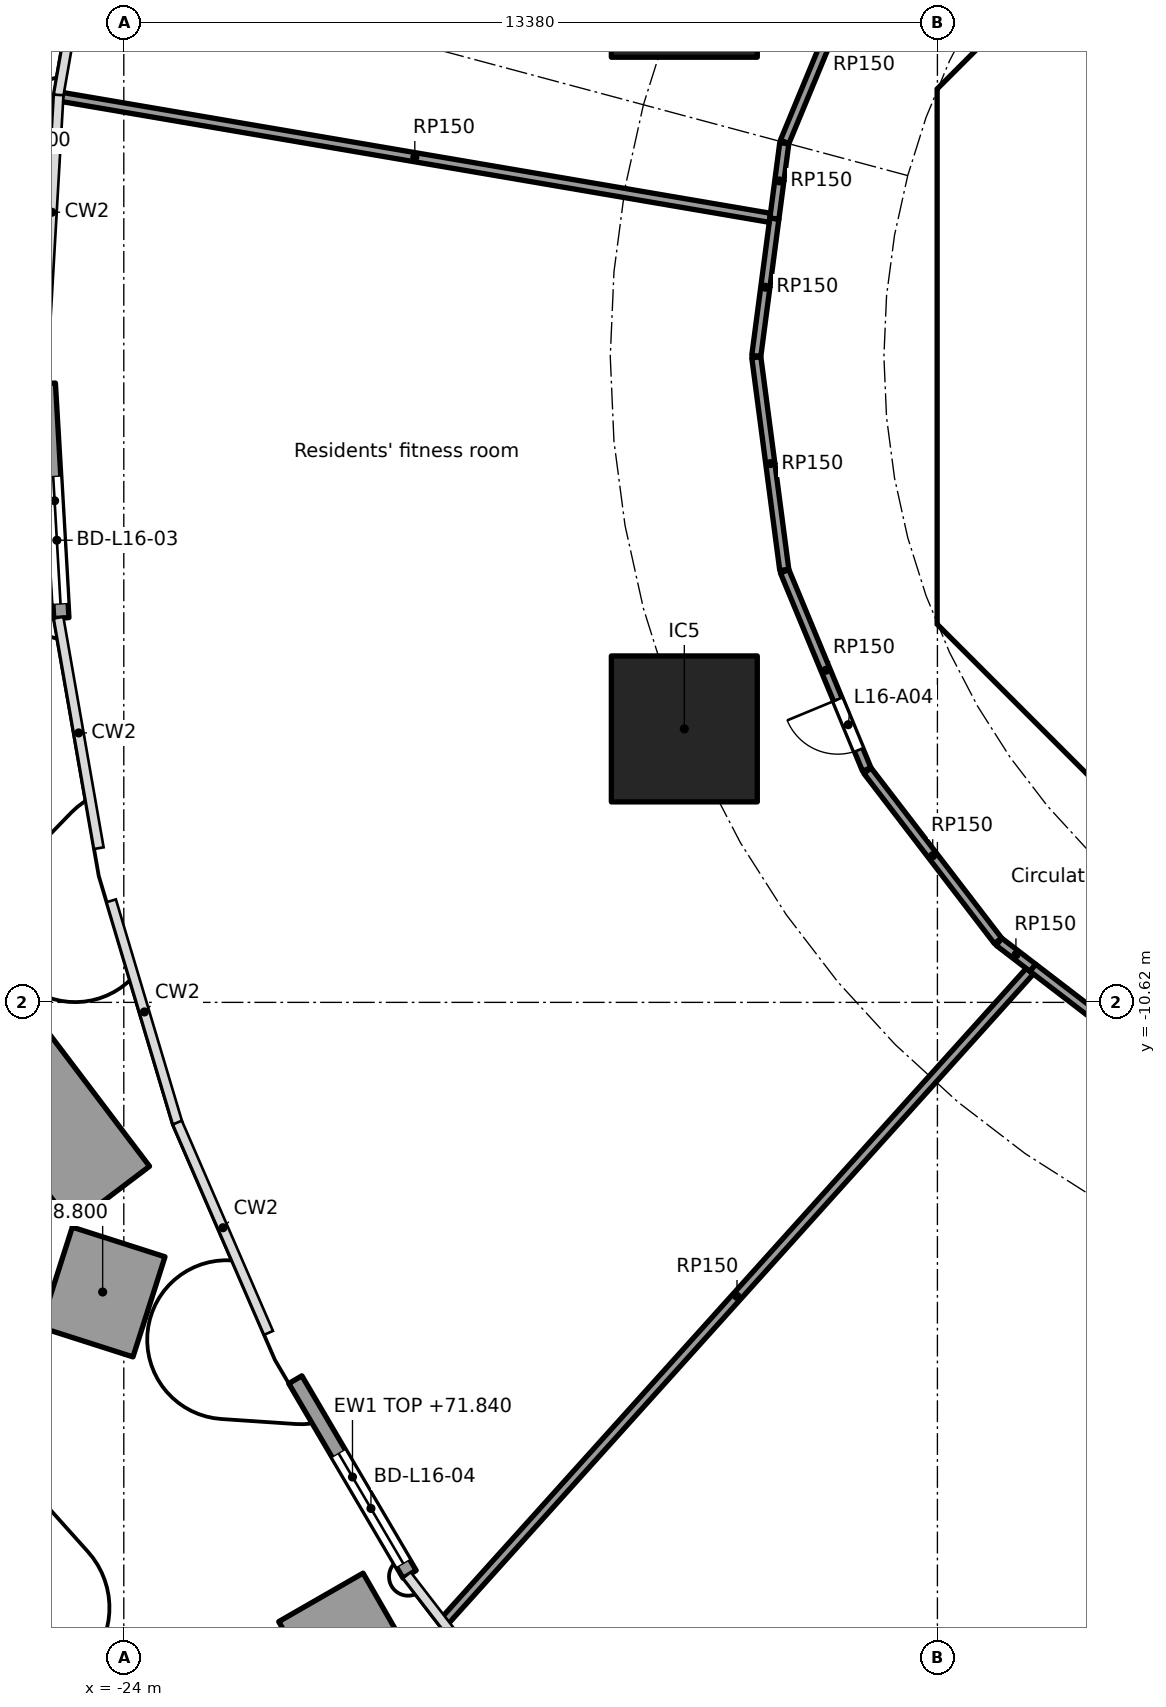
"""IFC4 building model, lengths in metres.
Left out: names, types, materials, properties, quantities, classifications, styles, units other than length and angle.
Written with IfcOpenShell. Run it as: python <this file> out.ifc"""

import sys

from ifc_helpers import new_model, si_unit, direction, frame, frame_2d, origin, origin_2d, place, context, subcontext, project, spatial, polyline, rectangle, outline, extrude, element, fill, save


model = new_model("IFC4")
c1 = context("Model", 3, precision=1e-05, world=origin(), true_north=direction((0.0, 1.0)))
c2 = subcontext(c1, "Body", "Model", "MODEL_VIEW")
j1 = project(units=[si_unit("LENGTHUNIT", "METRE"), si_unit("PLANEANGLEUNIT", "RADIAN")], contexts=[c1])
p1 = place(None, origin())
s1 = spatial("IfcSite", under=j1, at=p1, CompositionType="ELEMENT")
p2 = place(p1, origin())
s2 = spatial("IfcBuilding", under=s1, at=p2, CompositionType="ELEMENT")
p3 = place(p2, frame((0.0, 0.0, 67.7)))
s3 = spatial("IfcBuildingStorey", under=s2, at=p3, CompositionType="ELEMENT", Elevation=67.7)
for number, where, z_axis, x_axis in (
    (1, (-14.782, 6.123, 0.0), (0.0, 0.0, 1.0), (1.0, 0.0, 0.0)),
    (2, (-14.782, -6.123, 0.0), (0.0, 0.0, 1.0), (1.0, 0.0, 0.0)),
):
    element("IfcColumn", number, at=place(p3, frame(where, z_axis=z_axis, x_axis=x_axis)), inside=s3, PredefinedType="COLUMN", context=c2, shape_type="SweptSolid", body=[
        extrude(rectangle(XDim=2.4, YDim=2.4, at=origin_2d()), origin(), (0.0, 0.0, 1.0), 5.6),
    ])
p4 = place(p3, frame((-25.027, -4.3, 0.0), z_axis=(0.0, 0.0, 1.0), x_axis=(-0.057488767917, 0.998346153177, 0.0)))
e3 = element("IfcWall", 3, at=p4, inside=s3, PredefinedType="SOLIDWALL", context=c2, shape_type="SweptSolid", body=[
    extrude(rectangle(XDim=3.865, YDim=0.25, at=frame_2d((1.932, 0.0))), origin(), (0.0, 0.0, 1.0), 5.34),
])
p5 = place(p4, frame((0.232, 0.0, 0.0)))
e4 = element("IfcOpeningElement", 4, at=p5, cuts=e3, PredefinedType="OPENING", context=c2, shape_type="SweptSolid", body=[
    extrude(rectangle(XDim=2.1, YDim=2.4, at=frame_2d((1.05, 1.2))), frame((0.0, 0.135, 0.0), z_axis=(0.0, -1.0, 0.0), x_axis=(1.0, 0.0, 0.0)), (0.0, 0.0, 1.0), 0.27),
])
p6 = place(p3, frame((-19.3, -20.026, 0.0), z_axis=(0.0, 0.0, 1.0), x_axis=(-0.506338799739, 0.862334633352, 0.0)))
e5 = element("IfcWall", 5, at=p6, inside=s3, PredefinedType="SOLIDWALL", context=c2, shape_type="SweptSolid", body=[
    extrude(rectangle(XDim=3.712, YDim=0.25, at=frame_2d((1.856, 0.0))), origin(), (0.0, 0.0, 1.0), 4.14),
])
p7 = place(p6, frame((0.206, 0.0, 0.0)))
e6 = element("IfcOpeningElement", 6, at=p7, cuts=e5, PredefinedType="OPENING", context=c2, shape_type="SweptSolid", body=[
    extrude(rectangle(XDim=2.1, YDim=2.4, at=frame_2d((1.05, 1.2))), frame((0.0, 0.135, 0.0), z_axis=(0.0, -1.0, 0.0), x_axis=(1.0, 0.0, 0.0)), (0.0, 0.0, 1.0), 0.27),
])
p8 = place(p3, frame((-27.187, -9.874, 0.0), z_axis=(0.0, 0.0, 1.0), x_axis=(0.603738339335, -0.797182549745, 0.0)))
e7 = element("IfcWall", 7, at=p8, inside=s3, PredefinedType="SOLIDWALL", context=c2, shape_type="SweptSolid", body=[
    extrude(rectangle(XDim=4.923, YDim=1.6, at=frame_2d((2.462, 0.0))), origin(), (0.0, 0.0, 1.0), 1.1),
])
p9 = place(p3, frame((-24.084, -14.56, 0.0), z_axis=(0.0, 0.0, 1.0), x_axis=(-0.304632172772, -0.95247007266, 0.0)))
e8 = element("IfcWall", 8, at=p9, inside=s3, PredefinedType="SOLIDWALL", context=c2, shape_type="SweptSolid", body=[
    extrude(rectangle(XDim=1.728, YDim=1.6, at=frame_2d((0.864, 0.0))), origin(), (0.0, 0.0, 1.0), 1.1),
])
p10 = place(p3, frame((-20.758, -20.405, 0.0), z_axis=(0.0, 0.0, 1.0), x_axis=(0.498299562328, -0.867004928581, 0.0)))
e9 = element("IfcWall", 9, at=p10, inside=s3, PredefinedType="SOLIDWALL", context=c2, shape_type="SweptSolid", body=[
    extrude(rectangle(XDim=4.572, YDim=1.6, at=frame_2d((2.286, 0.0))), origin(), (0.0, 0.0, 1.0), 1.1),
])
p11 = place(p3, frame((-4.613, 9.988, 0.0), z_axis=(0.0, 0.0, 1.0), x_axis=(-0.707106781187, -0.707106781187, 0.0)))
e10 = element("IfcWall", 10, at=p11, inside=s3, PredefinedType="SHEAR", context=c2, shape_type="SweptSolid", body=[
    extrude(rectangle(XDim=7.602, YDim=0.6, at=frame_2d((3.801, 0.0))), origin(), (0.0, 0.0, 1.0), 5.34),
])
p12 = place(p11, frame((0.351, 0.0, 0.0)))
e11 = element("IfcOpeningElement", 11, at=p12, cuts=e10, PredefinedType="OPENING", context=c2, shape_type="SweptSolid", body=[
    extrude(rectangle(XDim=1.1, YDim=2.1, at=frame_2d((0.55, 1.05))), frame((0.0, 0.31, 0.0), z_axis=(0.0, -1.0, 0.0), x_axis=(1.0, 0.0, 0.0)), (0.0, 0.0, 1.0), 0.62),
])
p13 = place(p3, frame((-10.325, 3.801, 0.0), z_axis=(0.0, 0.0, 1.0), x_axis=(0.0, -1.0, 0.0)))
e12 = element("IfcWall", 12, at=p13, inside=s3, PredefinedType="SHEAR", context=c2, shape_type="SweptSolid", body=[
    extrude(rectangle(XDim=7.602, YDim=0.6, at=frame_2d((3.801, 0.0))), origin(), (0.0, 0.0, 1.0), 5.34),
])
p14 = place(p13, frame((0.651, 0.0, 0.0)))
e13 = element("IfcOpeningElement", 13, at=p14, cuts=e12, PredefinedType="OPENING", context=c2, shape_type="SweptSolid", body=[
    extrude(rectangle(XDim=1.5, YDim=2.1, at=frame_2d((0.75, 1.05))), frame((0.0, 0.31, 0.0), z_axis=(0.0, -1.0, 0.0), x_axis=(1.0, 0.0, 0.0)), (0.0, 0.0, 1.0), 0.62),
])
p15 = place(p13, frame((5.451, 0.0, 0.0)))
e14 = element("IfcOpeningElement", 14, at=p15, cuts=e12, PredefinedType="OPENING", context=c2, shape_type="SweptSolid", body=[
    extrude(rectangle(XDim=1.5, YDim=2.1, at=frame_2d((0.75, 1.05))), frame((0.0, 0.31, 0.0), z_axis=(0.0, -1.0, 0.0), x_axis=(1.0, 0.0, 0.0)), (0.0, 0.0, 1.0), 0.62),
])
p16 = place(p3, frame((-9.988, -4.613, 0.0), z_axis=(0.0, 0.0, 1.0), x_axis=(0.707106781187, -0.707106781187, 0.0)))
e15 = element("IfcWall", 15, at=p16, inside=s3, PredefinedType="SHEAR", context=c2, shape_type="SweptSolid", body=[
    extrude(rectangle(XDim=7.602, YDim=0.6, at=frame_2d((3.801, 0.0))), origin(), (0.0, 0.0, 1.0), 5.34),
])
p17 = place(p16, frame((6.151, 0.0, 0.0)))
e16 = element("IfcOpeningElement", 16, at=p17, cuts=e15, PredefinedType="OPENING", context=c2, shape_type="SweptSolid", body=[
    extrude(rectangle(XDim=1.1, YDim=2.1, at=frame_2d((0.55, 1.05))), frame((0.0, 0.31, 0.0), z_axis=(0.0, -1.0, 0.0), x_axis=(1.0, 0.0, 0.0)), (0.0, 0.0, 1.0), 0.62),
])
p18 = place(p3, origin())
e17 = element("IfcWall", 17, at=p18, inside=s3, PredefinedType="SHEAR", context=c2, shape_type="SweptSolid", body=[
    extrude(outline(polyline([(-10.625, -3.801), (-10.025, -3.801), (-10.025, -4.152), (-9.776, -4.401), (-10.2, -4.825), (-10.625, -4.401), (-10.625, -3.801)])), origin(), (0.0, 0.0, 1.0), 5.34),
])
p19 = place(p3, origin())
e18 = element("IfcWall", 18, at=p19, inside=s3, PredefinedType="SHEAR", context=c2, shape_type="SweptSolid", body=[
    extrude(outline(polyline([(-10.2, 4.825), (-9.776, 4.401), (-10.025, 4.152), (-10.025, 3.801), (-10.625, 3.801), (-10.625, 4.401), (-10.2, 4.825)])), origin(), (0.0, 0.0, 1.0), 5.34),
])
for number, where, z_axis, x_axis in (
    (19, (-10.025, -4.0, 0.0), (0.0, 0.0, 1.0), (1.0, 0.0, 0.0)),
    (20, (-10.025, 4.0, 0.0), (0.0, 0.0, 1.0), (1.0, 0.0, 0.0)),
):
    element("IfcWall", number, at=place(p3, frame(where, z_axis=z_axis, x_axis=x_axis)), inside=s3, PredefinedType="PARTITIONING", context=c2, shape_type="SweptSolid", body=[
        extrude(rectangle(XDim=3.325, YDim=0.2, at=frame_2d((1.662, 0.0))), origin(), (0.0, 0.0, 1.0), 5.34),
    ])
p20 = place(p3, frame((-13.598, 0.012, 0.0), z_axis=(0.0, 0.0, 1.0), x_axis=(0.130457285505, 0.991453930679, 0.0)))
e21 = element("IfcWall", 21, at=p20, inside=s3, PredefinedType="PARTITIONING", context=c2, shape_type="SweptSolid", body=[
    extrude(rectangle(XDim=2.278, YDim=0.15, at=frame_2d((1.139, 0.0))), origin(), (0.0, 0.0, 1.0), 5.34),
])
p21 = place(p3, frame((-13.375, 2.282, 0.0), z_axis=(0.0, 0.0, 1.0), x_axis=(-0.985753347153, 0.168197320361, 0.0)))
e22 = element("IfcWall", 22, at=p21, inside=s3, PredefinedType="PARTITIONING", context=c2, shape_type="SweptSolid", body=[
    extrude(rectangle(XDim=11.847, YDim=0.15, at=frame_2d((5.924, 0.0))), origin(), (0.0, 0.0, 1.0), 5.34),
])
p22 = place(p3, frame((-13.301, 2.27, 0.0), z_axis=(0.0, 0.0, 1.0), x_axis=(0.130575867104, 0.991438320285, 0.0)))
e23 = element("IfcWall", 23, at=p22, inside=s3, PredefinedType="PARTITIONING", context=c2, shape_type="SweptSolid", body=[
    extrude(rectangle(XDim=1.249, YDim=0.15, at=frame_2d((0.625, 0.0))), origin(), (0.0, 0.0, 1.0), 5.34),
])
p23 = place(p3, frame((-13.138, -3.508, 0.0), z_axis=(0.0, 0.0, 1.0), x_axis=(-0.130499283623, 0.991448403586, 0.0)))
e24 = element("IfcWall", 24, at=p23, inside=s3, PredefinedType="PARTITIONING", context=c2, shape_type="SweptSolid", body=[
    extrude(rectangle(XDim=3.527, YDim=0.15, at=frame_2d((1.763, 0.0))), origin(), (0.0, 0.0, 1.0), 5.34),
])
p24 = place(p3, frame((-13.132, 3.531, 0.0), z_axis=(0.0, 0.0, 1.0), x_axis=(0.382677866108, 0.923881838111, 0.0)))
e25 = element("IfcWall", 25, at=p24, inside=s3, PredefinedType="PARTITIONING", context=c2, shape_type="SweptSolid", body=[
    extrude(rectangle(XDim=3.527, YDim=0.15, at=frame_2d((1.763, 0.0))), origin(), (0.0, 0.0, 1.0), 5.34),
])
p25 = place(p24, frame((2.281, 0.0, 0.0)))
e26 = element("IfcOpeningElement", 26, at=p25, cuts=e25, PredefinedType="OPENING", context=c2, shape_type="SweptSolid", body=[
    extrude(rectangle(XDim=0.9, YDim=2.1, at=frame_2d((0.45, 1.05))), frame((0.0, 0.085, 0.0), z_axis=(0.0, -1.0, 0.0), x_axis=(1.0, 0.0, 0.0)), (0.0, 0.0, 1.0), 0.17),
])
p26 = place(p3, frame((-11.782, -6.789, 0.0), z_axis=(0.0, 0.0, 1.0), x_axis=(-0.382677866108, 0.923881838111, 0.0)))
e27 = element("IfcWall", 27, at=p26, inside=s3, PredefinedType="PARTITIONING", context=c2, shape_type="SweptSolid", body=[
    extrude(rectangle(XDim=3.527, YDim=0.15, at=frame_2d((1.763, 0.0))), origin(), (0.0, 0.0, 1.0), 5.34),
])
p27 = place(p26, frame((0.346, 0.0, 0.0)))
e28 = element("IfcOpeningElement", 28, at=p27, cuts=e27, PredefinedType="OPENING", context=c2, shape_type="SweptSolid", body=[
    extrude(rectangle(XDim=0.9, YDim=2.1, at=frame_2d((0.45, 1.05))), frame((0.0, 0.085, 0.0), z_axis=(0.0, -1.0, 0.0), x_axis=(1.0, 0.0, 0.0)), (0.0, 0.0, 1.0), 0.17),
])
p28 = place(p3, frame((-9.624, -9.607, 0.0), z_axis=(0.0, 0.0, 1.0), x_axis=(-0.608736710054, 0.793372307201, 0.0)))
e29 = element("IfcWall", 29, at=p28, inside=s3, PredefinedType="PARTITIONING", context=c2, shape_type="SweptSolid", body=[
    extrude(rectangle(XDim=3.527, YDim=0.15, at=frame_2d((1.763, 0.0))), origin(), (0.0, 0.0, 1.0), 5.34),
])
p29 = place(p3, frame((-9.101, -10.107, 0.0), z_axis=(0.0, 0.0, 1.0), x_axis=(-0.669132472721, -0.743143144994, 0.0)))
e30 = element("IfcWall", 30, at=p29, inside=s3, PredefinedType="PARTITIONING", context=c2, shape_type="SweptSolid", body=[
    extrude(rectangle(XDim=14.392, YDim=0.15, at=frame_2d((7.196, 0.0))), origin(), (0.0, 0.0, 1.0), 5.34),
])
p30 = place(p3, frame((-9.05, -10.051, 0.0), z_axis=(0.0, 0.0, 1.0), x_axis=(-0.793399175387, 0.608701690893, 0.0)))
e31 = element("IfcWall", 31, at=p30, inside=s3, PredefinedType="PARTITIONING", context=c2, shape_type="SweptSolid", body=[
    extrude(rectangle(XDim=0.702, YDim=0.15, at=frame_2d((0.351, 0.0))), origin(), (0.0, 0.0, 1.0), 5.34),
])
p31 = place(p3, frame((-6.809, -11.771, 0.0), z_axis=(0.0, 0.0, 1.0), x_axis=(-0.793365630445, 0.608745411834, 0.0)))
e32 = element("IfcWall", 32, at=p31, inside=s3, PredefinedType="PARTITIONING", context=c2, shape_type="SweptSolid", body=[
    extrude(rectangle(XDim=2.825, YDim=0.15, at=frame_2d((1.412, 0.0))), origin(), (0.0, 0.0, 1.0), 5.34),
])
p32 = place(p5, origin())
e33 = element("IfcDoor", 33, at=p32, inside=s3, OperationType="SLIDING_TO_LEFT", PredefinedType="DOOR", context=c2, shape_type="SweptSolid", body=[
    extrude(rectangle(XDim=2.1, YDim=2.4, at=frame_2d((1.05, 1.2))), frame((0.0, 0.025, 0.0), z_axis=(0.0, -1.0, 0.0), x_axis=(1.0, 0.0, 0.0)), (0.0, 0.0, 1.0), 0.05),
])
fill(e4, e33)
p33 = place(p7, origin())
e34 = element("IfcDoor", 34, at=p33, inside=s3, OperationType="SLIDING_TO_LEFT", PredefinedType="DOOR", context=c2, shape_type="SweptSolid", body=[
    extrude(rectangle(XDim=2.1, YDim=2.4, at=frame_2d((1.05, 1.2))), frame((0.0, 0.025, 0.0), z_axis=(0.0, -1.0, 0.0), x_axis=(1.0, 0.0, 0.0)), (0.0, 0.0, 1.0), 0.05),
])
fill(e6, e34)
p34 = place(p14, origin())
e35 = element("IfcDoor", 35, at=p34, inside=s3, OperationType="DOUBLE_DOOR_SINGLE_SWING", PredefinedType="DOOR", context=c2, shape_type="SweptSolid", body=[
    extrude(rectangle(XDim=1.5, YDim=2.1, at=frame_2d((0.75, 1.05))), frame((0.0, 0.025, 0.0), z_axis=(0.0, -1.0, 0.0), x_axis=(1.0, 0.0, 0.0)), (0.0, 0.0, 1.0), 0.05),
])
fill(e13, e35)
p35 = place(p15, origin())
e36 = element("IfcDoor", 36, at=p35, inside=s3, OperationType="DOUBLE_DOOR_SINGLE_SWING", PredefinedType="DOOR", context=c2, shape_type="SweptSolid", body=[
    extrude(rectangle(XDim=1.5, YDim=2.1, at=frame_2d((0.75, 1.05))), frame((0.0, 0.025, 0.0), z_axis=(0.0, -1.0, 0.0), x_axis=(1.0, 0.0, 0.0)), (0.0, 0.0, 1.0), 0.05),
])
fill(e14, e36)
p36 = place(p27, origin())
e37 = element("IfcDoor", 37, at=p36, inside=s3, OperationType="SINGLE_SWING_RIGHT", PredefinedType="DOOR", context=c2, shape_type="SweptSolid", body=[
    extrude(rectangle(XDim=0.9, YDim=2.1, at=frame_2d((0.45, 1.05))), frame((0.0, 0.025, 0.0), z_axis=(0.0, -1.0, 0.0), x_axis=(1.0, 0.0, 0.0)), (0.0, 0.0, 1.0), 0.05),
])
fill(e28, e37)
save(model, sys.argv[1])
